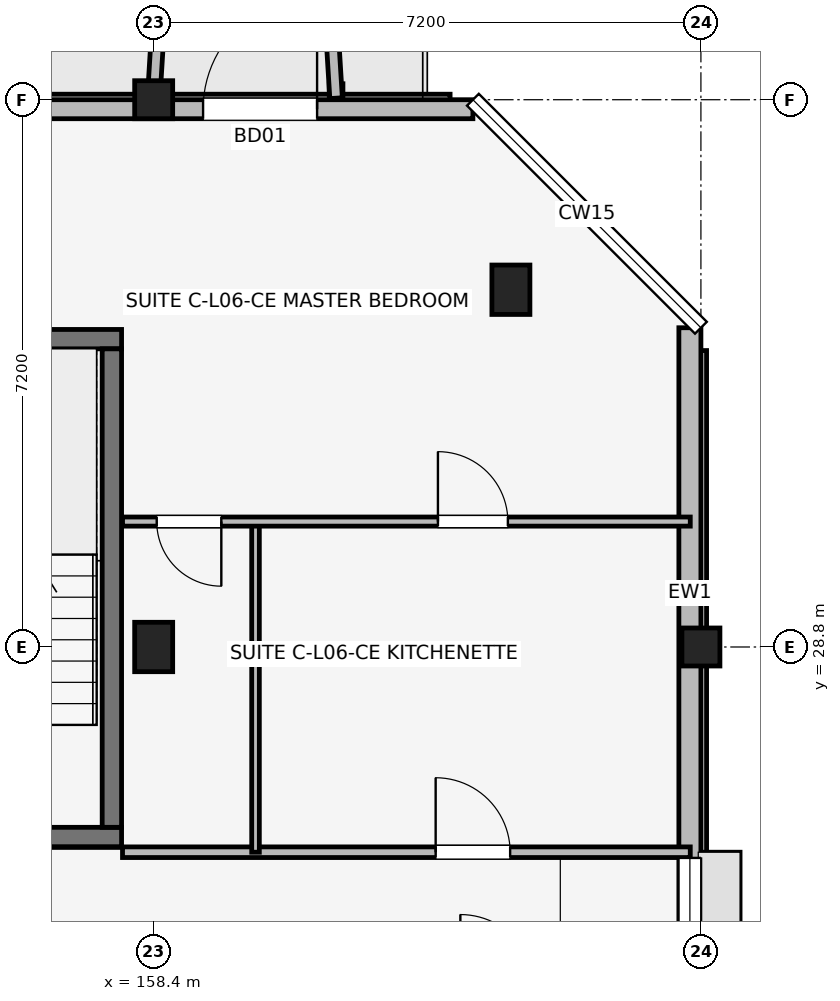
"""IFC4 building model, lengths in metres.
Left out: names, types, materials, properties, quantities, classifications, styles, units other than length and angle.
Written with IfcOpenShell. Run it as: python <this file> out.ifc"""

import sys

from ifc_helpers import new_model, si_unit, direction, frame, frame_2d, origin, origin_2d, place, context, subcontext, project, spatial, rectangle, extrude, element, fill, save


model = new_model("IFC4")
c1 = context("Model", 3, precision=1e-05, world=origin(), true_north=direction((0.0, 1.0)))
c2 = subcontext(c1, "Body", "Model", "MODEL_VIEW")
j1 = project(units=[si_unit("LENGTHUNIT", "METRE"), si_unit("PLANEANGLEUNIT", "RADIAN")], contexts=[c1])
p1 = place(None, origin())
s1 = spatial("IfcSite", under=j1, at=p1, CompositionType="ELEMENT")
p2 = place(p1, origin())
s2 = spatial("IfcBuilding", under=s1, at=p2, CompositionType="ELEMENT")
p3 = place(p2, frame((0.0, 0.0, 21.3)))
s3 = spatial("IfcBuildingStorey", under=s2, at=p3, CompositionType="ELEMENT", Elevation=21.3)
p4 = place(p3, frame((158.4, 28.8, 0.0), z_axis=(0.0, 0.0, 1.0), x_axis=(1.0, 0.0, 0.0)))
e1 = element("IfcColumn", 1, at=p4, inside=s3, PredefinedType="COLUMN", context=c2, shape_type="SweptSolid", body=[
    extrude(rectangle(XDim=0.5, YDim=0.65, at=origin_2d()), origin(), (0.0, 0.0, 1.0), 3.15),
])
for number, where, z_axis, x_axis in (
    (2, (158.4, 36.0, 0.0), (0.0, 0.0, 1.0), (1.0, 0.0, 0.0)),
    (3, (165.6, 28.8, 0.0), (0.0, 0.0, 1.0), (1.0, 0.0, 0.0)),
):
    element("IfcColumn", number, at=place(p3, frame(where, z_axis=z_axis, x_axis=x_axis)), inside=s3, PredefinedType="COLUMN", context=c2, shape_type="SweptSolid", body=[
        extrude(rectangle(XDim=0.5, YDim=0.5, at=origin_2d()), origin(), (0.0, 0.0, 1.0), 3.15),
    ])
p5 = place(p3, frame((163.1, 33.5, 0.0), z_axis=(0.0, 0.0, 1.0), x_axis=(1.0, 0.0, 0.0)))
e4 = element("IfcColumn", 4, at=p5, inside=s3, PredefinedType="COLUMN", context=c2, shape_type="SweptSolid", body=[
    extrude(rectangle(XDim=0.5, YDim=0.65, at=origin_2d()), origin(), (0.0, 0.0, 1.0), 3.15),
])
p6 = place(p3, frame((154.673, 26.3, 0.0), z_axis=(0.0, 0.0, 1.0), x_axis=(1.0, 0.0, 0.0)))
e5 = element("IfcWall", 5, at=p6, inside=s3, PredefinedType="SHEAR", context=c2, shape_type="SweptSolid", body=[
    extrude(rectangle(XDim=3.305, YDim=0.255, at=frame_2d((1.652, 0.0))), origin(), (0.0, 0.0, 1.0), 3.15),
])
p7 = place(p6, frame((1.127, 0.0, 0.0)))
e6 = element("IfcOpeningElement", 6, at=p7, cuts=e5, PredefinedType="OPENING", context=c2, shape_type="SweptSolid", body=[
    extrude(rectangle(XDim=1.05, YDim=2.12, at=frame_2d((0.525, 1.06))), frame((0.0, 0.137, 0.0), z_axis=(0.0, -1.0, 0.0), x_axis=(1.0, 0.0, 0.0)), (0.0, 0.0, 1.0), 0.275),
])
p8 = place(p3, frame((154.673, 32.85, 0.0), z_axis=(0.0, 0.0, 1.0), x_axis=(1.0, 0.0, 0.0)))
e7 = element("IfcWall", 7, at=p8, inside=s3, PredefinedType="SHEAR", context=c2, shape_type="SweptSolid", body=[
    extrude(rectangle(XDim=3.305, YDim=0.255, at=frame_2d((1.652, 0.0))), origin(), (0.0, 0.0, 1.0), 3.15),
])
p9 = place(p3, frame((157.85, 26.427, 0.0), z_axis=(0.0, 0.0, 1.0), x_axis=(0.0, 1.0, 0.0)))
e8 = element("IfcWall", 8, at=p9, inside=s3, PredefinedType="SHEAR", context=c2, shape_type="SweptSolid", body=[
    extrude(rectangle(XDim=6.295, YDim=0.255, at=frame_2d((3.147, 0.0))), origin(), (0.0, 0.0, 1.0), 3.15),
])
p10 = place(p3, frame((165.455, 17.4, 0.0), z_axis=(0.0, 0.0, 1.0), x_axis=(0.0, 1.0, 0.0)))
e9 = element("IfcWall", 9, at=p10, inside=s3, PredefinedType="SOLIDWALL", context=c2, shape_type="SweptSolid", body=[
    extrude(rectangle(XDim=15.6, YDim=0.29, at=frame_2d((7.8, 0.0))), origin(), (0.0, 0.0, 1.0), 2.43),
])
p11 = place(p10, frame((6.975, 0.0, 1.05)))
e10 = element("IfcOpeningElement", 10, at=p11, cuts=e9, PredefinedType="OPENING", context=c2, shape_type="SweptSolid", body=[
    extrude(rectangle(XDim=1.65, YDim=1.15, at=frame_2d((0.825, 0.575))), frame((0.0, 0.155, 0.0), z_axis=(0.0, -1.0, 0.0), x_axis=(1.0, 0.0, 0.0)), (0.0, 0.0, 1.0), 0.31),
])
p12 = place(p10, frame((1.35, 0.0, 0.72)))
e11 = element("IfcOpeningElement", 11, at=p12, cuts=e9, PredefinedType="OPENING", context=c2, shape_type="SweptSolid", body=[
    extrude(rectangle(XDim=1.42, YDim=1.6, at=frame_2d((0.71, 0.8))), frame((0.0, 0.155, 0.0), z_axis=(0.0, -1.0, 0.0), x_axis=(1.0, 0.0, 0.0)), (0.0, 0.0, 1.0), 0.31),
])
p13 = place(p3, frame((162.6, 35.875, 0.0), z_axis=(0.0, 0.0, 1.0), x_axis=(-1.0, 0.0, 0.0)))
e12 = element("IfcWall", 12, at=p13, inside=s3, PredefinedType="SOLIDWALL", context=c2, shape_type="SweptSolid", body=[
    extrude(rectangle(XDim=30.0, YDim=0.25, at=frame_2d((15.0, 0.0))), origin(), (0.0, 0.0, 1.0), 2.43),
])
p14 = place(p13, frame((27.95, 0.0, 0.0), z_axis=(0.0, 0.0, 1.0), x_axis=(-1.0, 0.0, 0.0)))
e13 = element("IfcOpeningElement", 13, at=p14, cuts=e12, PredefinedType="OPENING", context=c2, shape_type="SweptSolid", body=[
    extrude(rectangle(XDim=1.5, YDim=2.15, at=frame_2d((0.75, 1.075))), frame((0.0, 0.135, 0.0), z_axis=(0.0, -1.0, 0.0), x_axis=(1.0, 0.0, 0.0)), (0.0, 0.0, 1.0), 0.27),
])
p15 = place(p13, frame((3.55, 0.0, 0.0), z_axis=(0.0, 0.0, 1.0), x_axis=(-1.0, 0.0, 0.0)))
e14 = element("IfcOpeningElement", 14, at=p15, cuts=e12, PredefinedType="OPENING", context=c2, shape_type="SweptSolid", body=[
    extrude(rectangle(XDim=1.5, YDim=2.15, at=frame_2d((0.75, 1.075))), frame((0.0, 0.135, 0.0), z_axis=(0.0, -1.0, 0.0), x_axis=(1.0, 0.0, 0.0)), (0.0, 0.0, 1.0), 0.27),
])
p16 = place(p13, frame((14.625, 0.0, 0.5)))
e15 = element("IfcOpeningElement", 15, at=p16, cuts=e12, PredefinedType="OPENING", context=c2, shape_type="SweptSolid", body=[
    extrude(rectangle(XDim=0.75, YDim=1.75, at=frame_2d((0.375, 0.875))), frame((0.0, 0.135, 0.0), z_axis=(0.0, -1.0, 0.0), x_axis=(1.0, 0.0, 0.0)), (0.0, 0.0, 1.0), 0.27),
])
p17 = place(p13, frame((9.195, 0.0, 0.7)))
e16 = element("IfcOpeningElement", 16, at=p17, cuts=e12, PredefinedType="OPENING", context=c2, shape_type="SweptSolid", body=[
    extrude(rectangle(XDim=1.72, YDim=1.6, at=frame_2d((0.86, 0.8))), frame((0.0, 0.135, 0.0), z_axis=(0.0, -1.0, 0.0), x_axis=(1.0, 0.0, 0.0)), (0.0, 0.0, 1.0), 0.27),
])
p18 = place(p13, frame((19.015, 0.0, 0.7)))
e17 = element("IfcOpeningElement", 17, at=p18, cuts=e12, PredefinedType="OPENING", context=c2, shape_type="SweptSolid", body=[
    extrude(rectangle(XDim=1.86, YDim=1.6, at=frame_2d((0.93, 0.8))), frame((0.0, 0.135, 0.0), z_axis=(0.0, -1.0, 0.0), x_axis=(1.0, 0.0, 0.0)), (0.0, 0.0, 1.0), 0.27),
])
for number, where, z_axis, x_axis in (
    (18, (158.4, 36.02, 0.0), (0.0, 0.0, 1.0), (0.061, 0.998, 0.0)),
    (19, (160.8, 36.02, 0.0), (0.0, 0.0, 1.0), (-0.061, 0.998, 0.0)),
):
    element("IfcWall", number, at=place(p3, frame(where, z_axis=z_axis, x_axis=x_axis)), inside=s3, PredefinedType="ELEMENTEDWALL", context=c2, shape_type="SweptSolid", body=[
        extrude(rectangle(XDim=1.964, YDim=0.165, at=frame_2d((0.982, 0.0))), origin(), (0.0, 0.0, 1.0), 2.95),
    ])
p19 = place(p3, frame((157.99, 26.1, 0.0), z_axis=(0.0, 0.0, 1.0), x_axis=(1.0, 0.0, 0.0)))
e20 = element("IfcWall", 20, at=p19, inside=s3, PredefinedType="PARTITIONING", context=c2, shape_type="SweptSolid", body=[
    extrude(rectangle(XDim=7.47, YDim=0.14, at=frame_2d((3.735, 0.0))), origin(), (0.0, 0.0, 1.0), 2.38),
])
p20 = place(p19, frame((4.12, 0.0, 0.0)))
e21 = element("IfcOpeningElement", 21, at=p20, cuts=e20, PredefinedType="OPENING", context=c2, shape_type="SweptSolid", body=[
    extrude(rectangle(XDim=0.98, YDim=2.1, at=frame_2d((0.49, 1.05))), frame((0.0, 0.08, 0.0), z_axis=(0.0, -1.0, 0.0), x_axis=(1.0, 0.0, 0.0)), (0.0, 0.0, 1.0), 0.16),
])
p21 = place(p3, frame((159.74, 26.1, 0.0), z_axis=(0.0, 0.0, 1.0), x_axis=(0.0, 1.0, 0.0)))
e22 = element("IfcWall", 22, at=p21, inside=s3, PredefinedType="PARTITIONING", context=c2, shape_type="SweptSolid", body=[
    extrude(rectangle(XDim=4.35, YDim=0.1, at=frame_2d((2.175, 0.0))), origin(), (0.0, 0.0, 1.0), 2.38),
])
p22 = place(p3, frame((157.99, 30.45, 0.0), z_axis=(0.0, 0.0, 1.0), x_axis=(1.0, 0.0, 0.0)))
e23 = element("IfcWall", 23, at=p22, inside=s3, PredefinedType="PARTITIONING", context=c2, shape_type="SweptSolid", body=[
    extrude(rectangle(XDim=7.47, YDim=0.12, at=frame_2d((3.735, 0.0))), origin(), (0.0, 0.0, 1.0), 2.38),
])
p23 = place(p22, frame((1.3, 0.0, 0.0), z_axis=(0.0, 0.0, 1.0), x_axis=(-1.0, 0.0, 0.0)))
e24 = element("IfcOpeningElement", 24, at=p23, cuts=e23, PredefinedType="OPENING", context=c2, shape_type="SweptSolid", body=[
    extrude(rectangle(XDim=0.85, YDim=2.08, at=frame_2d((0.425, 1.04))), frame((0.0, 0.07, 0.0), z_axis=(0.0, -1.0, 0.0), x_axis=(1.0, 0.0, 0.0)), (0.0, 0.0, 1.0), 0.14),
])
p24 = place(p22, frame((4.15, 0.0, 0.0)))
e25 = element("IfcOpeningElement", 25, at=p24, cuts=e23, PredefinedType="OPENING", context=c2, shape_type="SweptSolid", body=[
    extrude(rectangle(XDim=0.92, YDim=2.08, at=frame_2d((0.46, 1.04))), frame((0.0, 0.07, 0.0), z_axis=(0.0, -1.0, 0.0), x_axis=(1.0, 0.0, 0.0)), (0.0, 0.0, 1.0), 0.14),
])
p25 = place(p15, origin())
e26 = element("IfcDoor", 26, at=p25, inside=s3, OperationType="SINGLE_SWING_LEFT", PredefinedType="DOOR", context=c2, shape_type="SweptSolid", body=[
    extrude(rectangle(XDim=1.5, YDim=2.15, at=frame_2d((0.75, 1.075))), frame((0.0, 0.025, 0.0), z_axis=(0.0, -1.0, 0.0), x_axis=(1.0, 0.0, 0.0)), (0.0, 0.0, 1.0), 0.05),
])
fill(e14, e26)
p26 = place(p11, origin())
e27 = element("IfcWindow", 27, at=p26, inside=s3, PartitioningType="SINGLE_PANEL", PredefinedType="WINDOW", context=c2, shape_type="SweptSolid", body=[
    extrude(rectangle(XDim=1.65, YDim=1.15, at=frame_2d((0.825, 0.575))), frame((0.0, 0.03, 0.0), z_axis=(0.0, -1.0, 0.0), x_axis=(1.0, 0.0, 0.0)), (0.0, 0.0, 1.0), 0.06),
])
fill(e10, e27)
p27 = place(p20, origin())
e28 = element("IfcDoor", 28, at=p27, inside=s3, OperationType="SINGLE_SWING_LEFT", PredefinedType="DOOR", context=c2, shape_type="SweptSolid", body=[
    extrude(rectangle(XDim=0.98, YDim=2.1, at=frame_2d((0.49, 1.05))), frame((0.0, 0.025, 0.0), z_axis=(0.0, -1.0, 0.0), x_axis=(1.0, 0.0, 0.0)), (0.0, 0.0, 1.0), 0.05),
])
fill(e21, e28)
p28 = place(p23, origin())
e29 = element("IfcDoor", 29, at=p28, inside=s3, OperationType="SINGLE_SWING_RIGHT", PredefinedType="DOOR", context=c2, shape_type="SweptSolid", body=[
    extrude(rectangle(XDim=0.85, YDim=2.08, at=frame_2d((0.425, 1.04))), frame((0.0, 0.025, 0.0), z_axis=(0.0, -1.0, 0.0), x_axis=(1.0, 0.0, 0.0)), (0.0, 0.0, 1.0), 0.05),
])
fill(e24, e29)
p29 = place(p24, origin())
e30 = element("IfcDoor", 30, at=p29, inside=s3, OperationType="SINGLE_SWING_LEFT", PredefinedType="DOOR", context=c2, shape_type="SweptSolid", body=[
    extrude(rectangle(XDim=0.92, YDim=2.08, at=frame_2d((0.46, 1.04))), frame((0.0, 0.025, 0.0), z_axis=(0.0, -1.0, 0.0), x_axis=(1.0, 0.0, 0.0)), (0.0, 0.0, 1.0), 0.05),
])
fill(e25, e30)
save(model, sys.argv[1])
